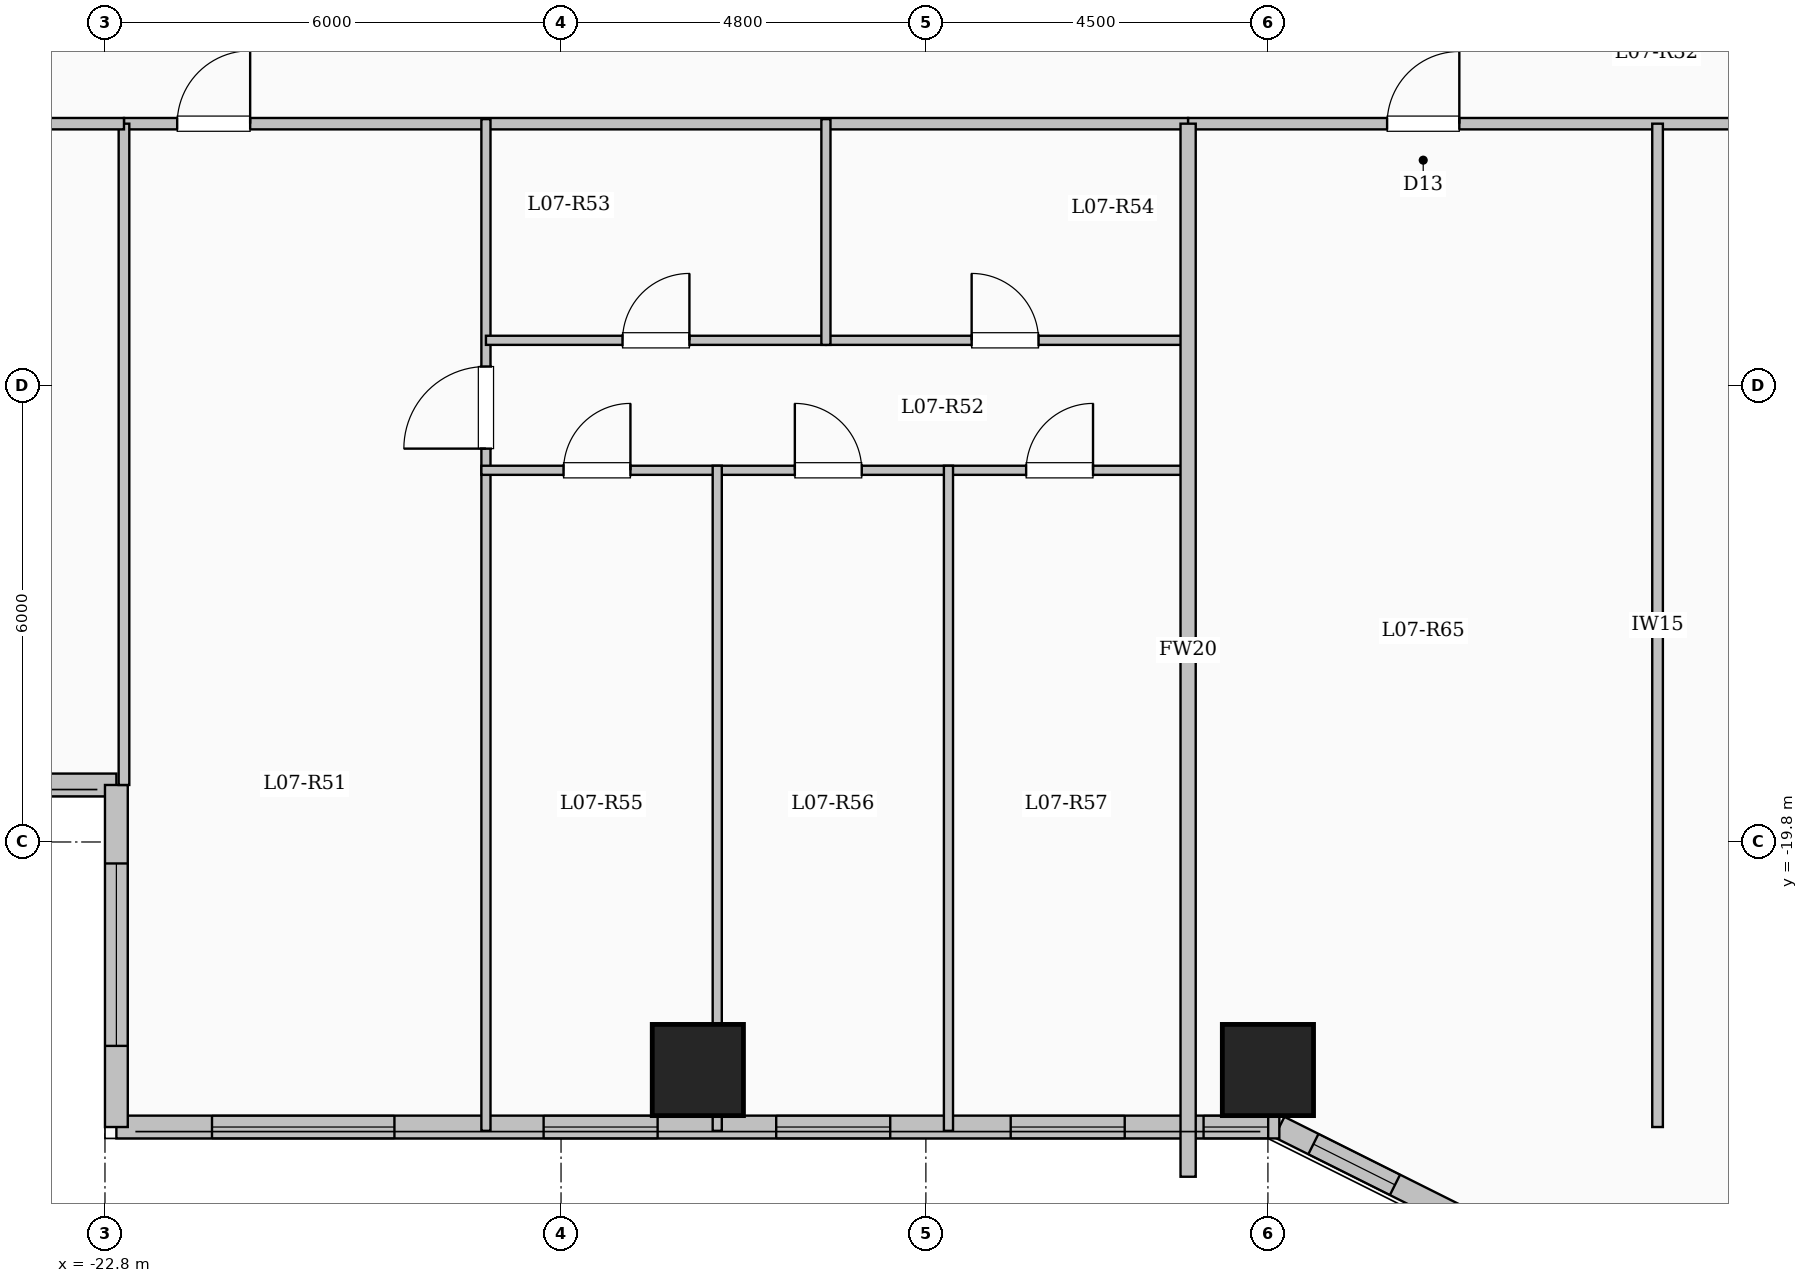
"""IFC4 building model, lengths in metres.
Left out: names, types, materials, properties, quantities, classifications, styles, units other than length and angle.
Written with IfcOpenShell. Run it as: python <this file> out.ifc"""

import sys

from ifc_helpers import new_model, si_unit, direction, frame, frame_2d, origin, origin_2d, place, context, subcontext, project, spatial, rectangle, extrude, element, fill, save


model = new_model("IFC4")
c1 = context("Model", 3, precision=1e-05, world=origin(), true_north=direction((0.0, 1.0)))
c2 = subcontext(c1, "Body", "Model", "MODEL_VIEW")
j1 = project(units=[si_unit("LENGTHUNIT", "METRE"), si_unit("PLANEANGLEUNIT", "RADIAN")], contexts=[c1])
p1 = place(None, origin())
s1 = spatial("IfcSite", under=j1, at=p1, CompositionType="ELEMENT")
p2 = place(p1, origin())
s2 = spatial("IfcBuilding", under=s1, at=p2, CompositionType="ELEMENT")
p3 = place(p2, frame((0.0, 0.0, 30.7)))
s3 = spatial("IfcBuildingStorey", under=s2, at=p3, CompositionType="ELEMENT", Elevation=30.7)
for number, where, z_axis, x_axis in (
    (1, (-15.0, -22.8, 0.0), (0.0, 0.0, 1.0), (1.0, 0.0, 0.0)),
    (2, (-7.5, -22.8, 0.0), (0.0, 0.0, 1.0), (1.0, 0.0, 0.0)),
):
    element("IfcColumn", number, at=place(p3, frame(where, z_axis=z_axis, x_axis=x_axis)), inside=s3, PredefinedType="COLUMN", context=c2, shape_type="SweptSolid", body=[
        extrude(rectangle(XDim=1.2, YDim=1.2, at=origin_2d()), origin(), (0.0, 0.0, 1.0), 3.35),
    ])
p4 = place(p3, frame((-22.65, -19.05, 0.0), z_axis=(0.0, 0.0, 1.0), x_axis=(-1.0, 0.0, 0.0)))
e3 = element("IfcWall", 3, at=p4, inside=s3, PredefinedType="SOLIDWALL", context=c2, shape_type="SweptSolid", body=[
    extrude(rectangle(XDim=6.0, YDim=0.3, at=frame_2d((3.0, 0.0))), origin(), (0.0, 0.0, 1.0), 3.1),
])
p5 = place(p4, frame((1.775, 0.0, 0.9)))
e4 = element("IfcOpeningElement", 4, at=p5, cuts=e3, PredefinedType="OPENING", context=c2, shape_type="SweptSolid", body=[
    extrude(rectangle(XDim=2.4, YDim=1.8, at=frame_2d((1.2, 0.9))), frame((0.0, 0.16, 0.0), z_axis=(0.0, -1.0, 0.0), x_axis=(1.0, 0.0, 0.0)), (0.0, 0.0, 1.0), 0.32),
])
p6 = place(p3, frame((-4.35, -25.05, 0.0), z_axis=(0.0, 0.0, 1.0), x_axis=(-0.894427191, 0.4472135955, 0.0)))
e5 = element("IfcWall", 5, at=p6, inside=s3, PredefinedType="SOLIDWALL", context=c2, shape_type="SweptSolid", body=[
    extrude(rectangle(XDim=3.354, YDim=0.3, at=frame_2d((1.677, 0.0))), origin(), (0.0, 0.0, 1.0), 3.1),
])
p7 = place(p6, frame((1.653, 0.0, 0.95)))
e6 = element("IfcOpeningElement", 6, at=p7, cuts=e5, PredefinedType="OPENING", context=c2, shape_type="SweptSolid", body=[
    extrude(rectangle(XDim=1.2, YDim=1.5, at=frame_2d((0.6, 0.75))), frame((0.0, 0.16, 0.0), z_axis=(0.0, -1.0, 0.0), x_axis=(1.0, 0.0, 0.0)), (0.0, 0.0, 1.0), 0.32),
])
p8 = place(p3, frame((-7.35, -23.55, 0.0), z_axis=(0.0, 0.0, 1.0), x_axis=(-1.0, 0.0, 0.0)))
e7 = element("IfcWall", 7, at=p8, inside=s3, PredefinedType="SOLIDWALL", context=c2, shape_type="SweptSolid", body=[
    extrude(rectangle(XDim=15.3, YDim=0.3, at=frame_2d((7.65, 0.0))), origin(), (0.0, 0.0, 1.0), 3.1),
])
p9 = place(p8, frame((0.147, 0.0, 0.95)))
e8 = element("IfcOpeningElement", 8, at=p9, cuts=e7, PredefinedType="OPENING", context=c2, shape_type="SweptSolid", body=[
    extrude(rectangle(XDim=0.85, YDim=1.5, at=frame_2d((0.425, 0.75))), frame((0.0, 0.16, 0.0), z_axis=(0.0, -1.0, 0.0), x_axis=(1.0, 0.0, 0.0)), (0.0, 0.0, 1.0), 0.32),
])
p10 = place(p8, frame((2.034, 0.0, 0.9)))
e9 = element("IfcOpeningElement", 9, at=p10, cuts=e7, PredefinedType="OPENING", context=c2, shape_type="SweptSolid", body=[
    extrude(rectangle(XDim=1.5, YDim=1.65, at=frame_2d((0.75, 0.825))), frame((0.0, 0.16, 0.0), z_axis=(0.0, -1.0, 0.0), x_axis=(1.0, 0.0, 0.0)), (0.0, 0.0, 1.0), 0.32),
])
p11 = place(p8, frame((5.119, 0.0, 0.9)))
e10 = element("IfcOpeningElement", 10, at=p11, cuts=e7, PredefinedType="OPENING", context=c2, shape_type="SweptSolid", body=[
    extrude(rectangle(XDim=1.5, YDim=1.65, at=frame_2d((0.75, 0.825))), frame((0.0, 0.16, 0.0), z_axis=(0.0, -1.0, 0.0), x_axis=(1.0, 0.0, 0.0)), (0.0, 0.0, 1.0), 0.32),
])
p12 = place(p8, frame((8.179, 0.0, 0.9)))
e11 = element("IfcOpeningElement", 11, at=p12, cuts=e7, PredefinedType="OPENING", context=c2, shape_type="SweptSolid", body=[
    extrude(rectangle(XDim=1.5, YDim=1.65, at=frame_2d((0.75, 0.825))), frame((0.0, 0.16, 0.0), z_axis=(0.0, -1.0, 0.0), x_axis=(1.0, 0.0, 0.0)), (0.0, 0.0, 1.0), 0.32),
])
p13 = place(p8, frame((11.642, 0.0, 0.9)))
e12 = element("IfcOpeningElement", 12, at=p13, cuts=e7, PredefinedType="OPENING", context=c2, shape_type="SweptSolid", body=[
    extrude(rectangle(XDim=2.4, YDim=1.8, at=frame_2d((1.2, 0.9))), frame((0.0, 0.16, 0.0), z_axis=(0.0, -1.0, 0.0), x_axis=(1.0, 0.0, 0.0)), (0.0, 0.0, 1.0), 0.32),
])
p14 = place(p3, frame((-22.65, -23.55, 0.0), z_axis=(0.0, 0.0, 1.0), x_axis=(0.0, 1.0, 0.0)))
e13 = element("IfcWall", 13, at=p14, inside=s3, PredefinedType="SOLIDWALL", context=c2, shape_type="SweptSolid", body=[
    extrude(rectangle(XDim=4.5, YDim=0.3, at=frame_2d((2.25, 0.0))), origin(), (0.0, 0.0, 1.0), 3.1),
])
p15 = place(p14, frame((1.067, 0.0, 0.9)))
e14 = element("IfcOpeningElement", 14, at=p15, cuts=e13, PredefinedType="OPENING", context=c2, shape_type="SweptSolid", body=[
    extrude(rectangle(XDim=2.4, YDim=1.8, at=frame_2d((1.2, 0.9))), frame((0.0, 0.16, 0.0), z_axis=(0.0, -1.0, 0.0), x_axis=(1.0, 0.0, 0.0)), (0.0, 0.0, 1.0), 0.32),
])
p16 = place(p3, frame((-22.55, -10.35, 0.0), z_axis=(0.0, 0.0, 1.0), x_axis=(1.0, 0.0, 0.0)))
e15 = element("IfcWall", 15, at=p16, inside=s3, PredefinedType="PARTITIONING", context=c2, shape_type="SweptSolid", body=[
    extrude(rectangle(XDim=14.0, YDim=0.15, at=frame_2d((7.0, 0.0))), origin(), (0.0, 0.0, 1.0), 3.1),
])
p17 = place(p16, frame((0.7, 0.0, 0.0)))
e16 = element("IfcOpeningElement", 16, at=p17, cuts=e15, PredefinedType="OPENING", context=c2, shape_type="SweptSolid", body=[
    extrude(rectangle(XDim=0.96, YDim=2.15, at=frame_2d((0.48, 1.075))), frame((0.0, 0.085, 0.0), z_axis=(0.0, -1.0, 0.0), x_axis=(1.0, 0.0, 0.0)), (0.0, 0.0, 1.0), 0.17),
])
p18 = place(p3, frame((-8.55, -10.35, 0.0), z_axis=(0.0, 0.0, 1.0), x_axis=(1.0, 0.0, 0.0)))
e17 = element("IfcWall", 17, at=p18, inside=s3, PredefinedType="PARTITIONING", context=c2, shape_type="SweptSolid", body=[
    extrude(rectangle(XDim=17.1, YDim=0.15, at=frame_2d((8.55, 0.0))), origin(), (0.0, 0.0, 1.0), 3.1),
])
p19 = place(p18, frame((2.618, 0.0, 0.0)))
e18 = element("IfcOpeningElement", 18, at=p19, cuts=e17, PredefinedType="OPENING", context=c2, shape_type="SweptSolid", body=[
    extrude(rectangle(XDim=0.95, YDim=2.15, at=frame_2d((0.475, 1.075))), frame((0.0, 0.085, 0.0), z_axis=(0.0, -1.0, 0.0), x_axis=(1.0, 0.0, 0.0)), (0.0, 0.0, 1.0), 0.17),
])
p20 = place(p18, frame((8.754, 0.0, 0.0)))
e19 = element("IfcOpeningElement", 19, at=p20, cuts=e17, PredefinedType="OPENING", context=c2, shape_type="SweptSolid", body=[
    extrude(rectangle(XDim=0.95, YDim=2.15, at=frame_2d((0.475, 1.075))), frame((0.0, 0.085, 0.0), z_axis=(0.0, -1.0, 0.0), x_axis=(1.0, 0.0, 0.0)), (0.0, 0.0, 1.0), 0.17),
])
p21 = place(p18, frame((14.211, 0.0, 0.0)))
e20 = element("IfcOpeningElement", 20, at=p21, cuts=e17, PredefinedType="OPENING", context=c2, shape_type="SweptSolid", body=[
    extrude(rectangle(XDim=0.95, YDim=2.15, at=frame_2d((0.475, 1.075))), frame((0.0, 0.085, 0.0), z_axis=(0.0, -1.0, 0.0), x_axis=(1.0, 0.0, 0.0)), (0.0, 0.0, 1.0), 0.17),
])
p22 = place(p3, frame((-17.788, -23.6, 0.0), z_axis=(0.0, 0.0, 1.0), x_axis=(0.0, 1.0, 0.0)))
e21 = element("IfcWall", 21, at=p22, inside=s3, PredefinedType="PARTITIONING", context=c2, shape_type="SweptSolid", body=[
    extrude(rectangle(XDim=13.31, YDim=0.12, at=frame_2d((6.655, 0.0))), origin(), (0.0, 0.0, 1.0), 3.1),
])
p23 = place(p22, frame((8.975, 0.0, 0.0)))
e22 = element("IfcOpeningElement", 22, at=p23, cuts=e21, PredefinedType="OPENING", context=c2, shape_type="SweptSolid", body=[
    extrude(rectangle(XDim=1.08, YDim=2.15, at=frame_2d((0.54, 1.075))), frame((0.0, 0.07, 0.0), z_axis=(0.0, -1.0, 0.0), x_axis=(1.0, 0.0, 0.0)), (0.0, 0.0, 1.0), 0.14),
])
p24 = place(p3, frame((-17.788, -13.2, 0.0), z_axis=(0.0, 0.0, 1.0), x_axis=(1.0, 0.0, 0.0)))
e23 = element("IfcWall", 23, at=p24, inside=s3, PredefinedType="PARTITIONING", context=c2, shape_type="SweptSolid", body=[
    extrude(rectangle(XDim=4.473, YDim=0.12, at=frame_2d((2.237, 0.0))), origin(), (0.0, 0.0, 1.0), 3.1),
])
p25 = place(p24, frame((1.797, 0.0, 0.0)))
e24 = element("IfcOpeningElement", 24, at=p25, cuts=e23, PredefinedType="OPENING", context=c2, shape_type="SweptSolid", body=[
    extrude(rectangle(XDim=0.88, YDim=2.1, at=frame_2d((0.44, 1.05))), frame((0.0, 0.07, 0.0), z_axis=(0.0, -1.0, 0.0), x_axis=(1.0, 0.0, 0.0)), (0.0, 0.0, 1.0), 0.14),
])
p26 = place(p3, frame((-13.315, -13.2, 0.0), z_axis=(0.0, 0.0, 1.0), x_axis=(1.0, 0.0, 0.0)))
e25 = element("IfcWall", 25, at=p26, inside=s3, PredefinedType="PARTITIONING", context=c2, shape_type="SweptSolid", body=[
    extrude(rectangle(XDim=4.715, YDim=0.12, at=frame_2d((2.357, 0.0))), origin(), (0.0, 0.0, 1.0), 3.1),
])
p27 = place(p26, frame((1.917, 0.0, 0.0)))
e26 = element("IfcOpeningElement", 26, at=p27, cuts=e25, PredefinedType="OPENING", context=c2, shape_type="SweptSolid", body=[
    extrude(rectangle(XDim=0.88, YDim=2.1, at=frame_2d((0.44, 1.05))), frame((0.0, 0.07, 0.0), z_axis=(0.0, -1.0, 0.0), x_axis=(1.0, 0.0, 0.0)), (0.0, 0.0, 1.0), 0.14),
])
p28 = place(p3, frame((-17.848, -14.91, 0.0), z_axis=(0.0, 0.0, 1.0), x_axis=(1.0, 0.0, 0.0)))
e27 = element("IfcWall", 27, at=p28, inside=s3, PredefinedType="PARTITIONING", context=c2, shape_type="SweptSolid", body=[
    extrude(rectangle(XDim=9.308, YDim=0.12, at=frame_2d((4.654, 0.0))), origin(), (0.0, 0.0, 1.0), 2.585),
])
p29 = place(p28, frame((1.081, 0.0, 0.0)))
e28 = element("IfcOpeningElement", 28, at=p29, cuts=e27, PredefinedType="OPENING", context=c2, shape_type="SweptSolid", body=[
    extrude(rectangle(XDim=0.88, YDim=2.1, at=frame_2d((0.44, 1.05))), frame((0.0, 0.07, 0.0), z_axis=(0.0, -1.0, 0.0), x_axis=(1.0, 0.0, 0.0)), (0.0, 0.0, 1.0), 0.14),
])
p30 = place(p28, frame((4.124, 0.0, 0.0)))
e29 = element("IfcOpeningElement", 29, at=p30, cuts=e27, PredefinedType="OPENING", context=c2, shape_type="SweptSolid", body=[
    extrude(rectangle(XDim=0.88, YDim=2.1, at=frame_2d((0.44, 1.05))), frame((0.0, 0.07, 0.0), z_axis=(0.0, -1.0, 0.0), x_axis=(1.0, 0.0, 0.0)), (0.0, 0.0, 1.0), 0.14),
])
p31 = place(p28, frame((7.167, 0.0, 0.0)))
e30 = element("IfcOpeningElement", 30, at=p31, cuts=e27, PredefinedType="OPENING", context=c2, shape_type="SweptSolid", body=[
    extrude(rectangle(XDim=0.88, YDim=2.1, at=frame_2d((0.44, 1.05))), frame((0.0, 0.07, 0.0), z_axis=(0.0, -1.0, 0.0), x_axis=(1.0, 0.0, 0.0)), (0.0, 0.0, 1.0), 0.14),
])
p32 = place(p3, frame((-13.315, -13.26, 0.0), z_axis=(0.0, 0.0, 1.0), x_axis=(0.0, 1.0, 0.0)))
e31 = element("IfcWall", 31, at=p32, inside=s3, PredefinedType="PARTITIONING", context=c2, shape_type="SweptSolid", body=[
    extrude(rectangle(XDim=2.97, YDim=0.12, at=frame_2d((1.485, 0.0))), origin(), (0.0, 0.0, 1.0), 3.1),
])
p33 = place(p3, frame((-14.745, -23.6, 0.0), z_axis=(0.0, 0.0, 1.0), x_axis=(0.0, 1.0, 0.0)))
e32 = element("IfcWall", 32, at=p33, inside=s3, PredefinedType="PARTITIONING", context=c2, shape_type="SweptSolid", body=[
    extrude(rectangle(XDim=8.75, YDim=0.12, at=frame_2d((4.375, 0.0))), origin(), (0.0, 0.0, 1.0), 2.435),
])
p34 = place(p3, frame((-11.703, -23.6, 0.0), z_axis=(0.0, 0.0, 1.0), x_axis=(0.0, 1.0, 0.0)))
e33 = element("IfcWall", 33, at=p34, inside=s3, PredefinedType="PARTITIONING", context=c2, shape_type="SweptSolid", body=[
    extrude(rectangle(XDim=8.75, YDim=0.12, at=frame_2d((4.375, 0.0))), origin(), (0.0, 0.0, 1.0), 3.1),
])
p35 = place(p3, frame((-8.55, -24.204, 0.0), z_axis=(0.0, 0.0, 1.0), x_axis=(0.0, 1.0, 0.0)))
e34 = element("IfcWall", 34, at=p35, inside=s3, PredefinedType="SOLIDWALL", context=c2, shape_type="SweptSolid", body=[
    extrude(rectangle(XDim=13.854, YDim=0.2, at=frame_2d((6.927, 0.0))), origin(), (0.0, 0.0, 1.0), 3.1),
])
p36 = place(p3, frame((-2.374, -23.55, 0.0), z_axis=(0.0, 0.0, 1.0), x_axis=(0.0, 1.0, 0.0)))
e35 = element("IfcWall", 35, at=p36, inside=s3, PredefinedType="PARTITIONING", context=c2, shape_type="SweptSolid", body=[
    extrude(rectangle(XDim=13.2, YDim=0.14, at=frame_2d((6.6, 0.0))), origin(), (0.0, 0.0, 1.0), 3.1),
])
p37 = place(p3, frame((-22.55, -19.05, 0.0), z_axis=(0.0, 0.0, 1.0), x_axis=(0.0, 1.0, 0.0)))
e36 = element("IfcWall", 36, at=p37, inside=s3, PredefinedType="PARTITIONING", context=c2, shape_type="SweptSolid", body=[
    extrude(rectangle(XDim=8.7, YDim=0.14, at=frame_2d((4.35, 0.0))), origin(), (0.0, 0.0, 1.0), 3.1),
])
p38 = place(p3, frame((-28.68, -10.35, 0.0), z_axis=(0.0, 0.0, 1.0), x_axis=(1.0, 0.0, 0.0)))
e37 = element("IfcWall", 37, at=p38, inside=s3, PredefinedType="PARTITIONING", context=c2, shape_type="SweptSolid", body=[
    extrude(rectangle(XDim=6.13, YDim=0.15, at=frame_2d((3.065, 0.0))), origin(), (0.0, 0.0, 1.0), 3.1),
])
p39 = place(p38, frame((2.59, 0.0, 0.0)))
e38 = element("IfcOpeningElement", 38, at=p39, cuts=e37, PredefinedType="OPENING", context=c2, shape_type="SweptSolid", body=[
    extrude(rectangle(XDim=0.95, YDim=2.15, at=frame_2d((0.475, 1.075))), frame((0.0, 0.085, 0.0), z_axis=(0.0, -1.0, 0.0), x_axis=(1.0, 0.0, 0.0)), (0.0, 0.0, 1.0), 0.17),
])
p40 = place(p7, origin())
e39 = element("IfcWindow", 39, at=p40, inside=s3, PartitioningType="SINGLE_PANEL", PredefinedType="WINDOW", context=c2, shape_type="SweptSolid", body=[
    extrude(rectangle(XDim=1.2, YDim=1.5, at=frame_2d((0.6, 0.75))), frame((0.0, 0.03, 0.0), z_axis=(0.0, -1.0, 0.0), x_axis=(1.0, 0.0, 0.0)), (0.0, 0.0, 1.0), 0.06),
])
fill(e6, e39)
p41 = place(p9, origin())
e40 = element("IfcWindow", 40, at=p41, inside=s3, PartitioningType="SINGLE_PANEL", PredefinedType="WINDOW", context=c2, shape_type="SweptSolid", body=[
    extrude(rectangle(XDim=0.85, YDim=1.5, at=frame_2d((0.425, 0.75))), frame((0.0, 0.03, 0.0), z_axis=(0.0, -1.0, 0.0), x_axis=(1.0, 0.0, 0.0)), (0.0, 0.0, 1.0), 0.06),
])
fill(e8, e40)
p42 = place(p10, origin())
e41 = element("IfcWindow", 41, at=p42, inside=s3, PartitioningType="SINGLE_PANEL", PredefinedType="WINDOW", context=c2, shape_type="SweptSolid", body=[
    extrude(rectangle(XDim=1.5, YDim=1.65, at=frame_2d((0.75, 0.825))), frame((0.0, 0.03, 0.0), z_axis=(0.0, -1.0, 0.0), x_axis=(1.0, 0.0, 0.0)), (0.0, 0.0, 1.0), 0.06),
])
fill(e9, e41)
p43 = place(p11, origin())
e42 = element("IfcWindow", 42, at=p43, inside=s3, PartitioningType="SINGLE_PANEL", PredefinedType="WINDOW", context=c2, shape_type="SweptSolid", body=[
    extrude(rectangle(XDim=1.5, YDim=1.65, at=frame_2d((0.75, 0.825))), frame((0.0, 0.03, 0.0), z_axis=(0.0, -1.0, 0.0), x_axis=(1.0, 0.0, 0.0)), (0.0, 0.0, 1.0), 0.06),
])
fill(e10, e42)
p44 = place(p12, origin())
e43 = element("IfcWindow", 43, at=p44, inside=s3, PartitioningType="SINGLE_PANEL", PredefinedType="WINDOW", context=c2, shape_type="SweptSolid", body=[
    extrude(rectangle(XDim=1.5, YDim=1.65, at=frame_2d((0.75, 0.825))), frame((0.0, 0.03, 0.0), z_axis=(0.0, -1.0, 0.0), x_axis=(1.0, 0.0, 0.0)), (0.0, 0.0, 1.0), 0.06),
])
fill(e11, e43)
p45 = place(p13, origin())
e44 = element("IfcWindow", 44, at=p45, inside=s3, PartitioningType="SINGLE_PANEL", PredefinedType="WINDOW", context=c2, shape_type="SweptSolid", body=[
    extrude(rectangle(XDim=2.4, YDim=1.8, at=frame_2d((1.2, 0.9))), frame((0.0, 0.03, 0.0), z_axis=(0.0, -1.0, 0.0), x_axis=(1.0, 0.0, 0.0)), (0.0, 0.0, 1.0), 0.06),
])
fill(e12, e44)
p46 = place(p15, origin())
e45 = element("IfcWindow", 45, at=p46, inside=s3, PartitioningType="SINGLE_PANEL", PredefinedType="WINDOW", context=c2, shape_type="SweptSolid", body=[
    extrude(rectangle(XDim=2.4, YDim=1.8, at=frame_2d((1.2, 0.9))), frame((0.0, 0.03, 0.0), z_axis=(0.0, -1.0, 0.0), x_axis=(1.0, 0.0, 0.0)), (0.0, 0.0, 1.0), 0.06),
])
fill(e14, e45)
p47 = place(p17, origin())
e46 = element("IfcDoor", 46, at=p47, inside=s3, OperationType="SINGLE_SWING_RIGHT", PredefinedType="DOOR", context=c2, shape_type="SweptSolid", body=[
    extrude(rectangle(XDim=0.96, YDim=2.15, at=frame_2d((0.48, 1.075))), frame((0.0, 0.025, 0.0), z_axis=(0.0, -1.0, 0.0), x_axis=(1.0, 0.0, 0.0)), (0.0, 0.0, 1.0), 0.05),
])
fill(e16, e46)
p48 = place(p23, origin())
e47 = element("IfcDoor", 47, at=p48, inside=s3, OperationType="SINGLE_SWING_LEFT", PredefinedType="DOOR", context=c2, shape_type="SweptSolid", body=[
    extrude(rectangle(XDim=1.08, YDim=2.15, at=frame_2d((0.54, 1.075))), frame((0.0, 0.025, 0.0), z_axis=(0.0, -1.0, 0.0), x_axis=(1.0, 0.0, 0.0)), (0.0, 0.0, 1.0), 0.05),
])
fill(e22, e47)
p49 = place(p25, origin())
e48 = element("IfcDoor", 48, at=p49, inside=s3, OperationType="SINGLE_SWING_RIGHT", PredefinedType="DOOR", context=c2, shape_type="SweptSolid", body=[
    extrude(rectangle(XDim=0.88, YDim=2.1, at=frame_2d((0.44, 1.05))), frame((0.0, 0.025, 0.0), z_axis=(0.0, -1.0, 0.0), x_axis=(1.0, 0.0, 0.0)), (0.0, 0.0, 1.0), 0.05),
])
fill(e24, e48)
p50 = place(p27, origin())
e49 = element("IfcDoor", 49, at=p50, inside=s3, OperationType="SINGLE_SWING_LEFT", PredefinedType="DOOR", context=c2, shape_type="SweptSolid", body=[
    extrude(rectangle(XDim=0.88, YDim=2.1, at=frame_2d((0.44, 1.05))), frame((0.0, 0.025, 0.0), z_axis=(0.0, -1.0, 0.0), x_axis=(1.0, 0.0, 0.0)), (0.0, 0.0, 1.0), 0.05),
])
fill(e26, e49)
p51 = place(p29, origin())
e50 = element("IfcDoor", 50, at=p51, inside=s3, OperationType="SINGLE_SWING_RIGHT", PredefinedType="DOOR", context=c2, shape_type="SweptSolid", body=[
    extrude(rectangle(XDim=0.88, YDim=2.1, at=frame_2d((0.44, 1.05))), frame((0.0, 0.025, 0.0), z_axis=(0.0, -1.0, 0.0), x_axis=(1.0, 0.0, 0.0)), (0.0, 0.0, 1.0), 0.05),
])
fill(e28, e50)
p52 = place(p30, origin())
e51 = element("IfcDoor", 51, at=p52, inside=s3, OperationType="SINGLE_SWING_LEFT", PredefinedType="DOOR", context=c2, shape_type="SweptSolid", body=[
    extrude(rectangle(XDim=0.88, YDim=2.1, at=frame_2d((0.44, 1.05))), frame((0.0, 0.025, 0.0), z_axis=(0.0, -1.0, 0.0), x_axis=(1.0, 0.0, 0.0)), (0.0, 0.0, 1.0), 0.05),
])
fill(e29, e51)
p53 = place(p31, origin())
e52 = element("IfcDoor", 52, at=p53, inside=s3, OperationType="SINGLE_SWING_RIGHT", PredefinedType="DOOR", context=c2, shape_type="SweptSolid", body=[
    extrude(rectangle(XDim=0.88, YDim=2.1, at=frame_2d((0.44, 1.05))), frame((0.0, 0.025, 0.0), z_axis=(0.0, -1.0, 0.0), x_axis=(1.0, 0.0, 0.0)), (0.0, 0.0, 1.0), 0.05),
])
fill(e30, e52)
p54 = place(p19, origin())
e53 = element("IfcDoor", 53, at=p54, inside=s3, OperationType="SINGLE_SWING_RIGHT", PredefinedType="DOOR", context=c2, shape_type="SweptSolid", body=[
    extrude(rectangle(XDim=0.95, YDim=2.15, at=frame_2d((0.475, 1.075))), frame((0.0, 0.025, 0.0), z_axis=(0.0, -1.0, 0.0), x_axis=(1.0, 0.0, 0.0)), (0.0, 0.0, 1.0), 0.05),
])
fill(e18, e53)
save(model, sys.argv[1])
